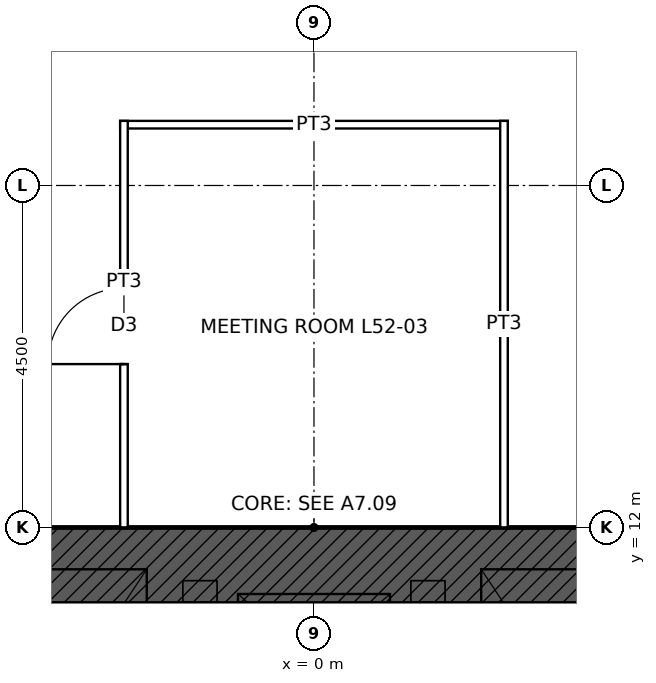
"""IFC4 building model, lengths in metres.
Left out: names, types, materials, properties, quantities, classifications, styles, units other than length and angle.
Written with IfcOpenShell. Run it as: python <this file> out.ifc"""

import sys

from ifc_helpers import new_model, si_unit, direction, frame, frame_2d, origin, place, context, subcontext, project, spatial, rectangle, extrude, element, fill, save


model = new_model("IFC4")
c1 = context("Model", 3, precision=1e-05, world=origin(), true_north=direction((0.0, 1.0)))
c2 = subcontext(c1, "Body", "Model", "MODEL_VIEW")
j1 = project(units=[si_unit("LENGTHUNIT", "METRE"), si_unit("PLANEANGLEUNIT", "RADIAN")], contexts=[c1])
p1 = place(None, origin())
s1 = spatial("IfcSite", under=j1, at=p1, CompositionType="ELEMENT")
p2 = place(p1, origin())
s2 = spatial("IfcBuilding", under=s1, at=p2, CompositionType="ELEMENT")
p3 = place(p2, frame((0.0, 0.0, 241.9)))
s3 = spatial("IfcBuildingStorey", under=s2, at=p3, CompositionType="ELEMENT", Elevation=241.9)
p4 = place(p3, frame((-12.0, 11.5, 0.0), z_axis=(0.0, 0.0, 1.0), x_axis=(1.0, 0.0, 0.0)))
e1 = element("IfcWall", 1, at=p4, inside=s3, PredefinedType="SHEAR", context=c2, shape_type="SweptSolid", body=[
    extrude(rectangle(XDim=24.0, YDim=1.0, at=frame_2d((12.0, 0.0))), origin(), (0.0, 0.0, 1.0), 4.0),
])
p5 = place(p4, frame((6.25, 0.0, 0.0)))
e2 = element("IfcOpeningElement", 2, at=p5, cuts=e1, PredefinedType="OPENING", context=c2, shape_type="SweptSolid", body=[
    extrude(rectangle(XDim=1.0, YDim=2.4, at=frame_2d((0.5, 1.2))), frame((0.0, 0.51, 0.0), z_axis=(0.0, -1.0, 0.0), x_axis=(1.0, 0.0, 0.0)), (0.0, 0.0, 1.0), 1.02),
])
p6 = place(p4, frame((16.75, 0.0, 0.0)))
e3 = element("IfcOpeningElement", 3, at=p6, cuts=e1, PredefinedType="OPENING", context=c2, shape_type="SweptSolid", body=[
    extrude(rectangle(XDim=1.0, YDim=2.4, at=frame_2d((0.5, 1.2))), frame((0.0, 0.51, 0.0), z_axis=(0.0, -1.0, 0.0), x_axis=(1.0, 0.0, 0.0)), (0.0, 0.0, 1.0), 1.02),
])
p7 = place(p3, frame((-2.55, 17.3, 0.0), z_axis=(0.0, 0.0, 1.0), x_axis=(1.0, 0.0, 0.0)))
e4 = element("IfcWall", 4, at=p7, inside=s3, PredefinedType="PARTITIONING", context=c2, shape_type="SweptSolid", body=[
    extrude(rectangle(XDim=5.1, YDim=0.1, at=frame_2d((2.55, 0.0))), origin(), (0.0, 0.0, 1.0), 3.85),
])
p8 = place(p3, frame((-2.5, 12.0, 0.0), z_axis=(0.0, 0.0, 1.0), x_axis=(0.0, 1.0, 0.0)))
e5 = element("IfcWall", 5, at=p8, inside=s3, PredefinedType="PARTITIONING", context=c2, shape_type="SweptSolid", body=[
    extrude(rectangle(XDim=5.35, YDim=0.1, at=frame_2d((2.675, 0.0))), origin(), (0.0, 0.0, 1.0), 3.85),
])
p9 = place(p8, frame((2.15, 0.0, 0.0)))
e6 = element("IfcOpeningElement", 6, at=p9, cuts=e5, PredefinedType="OPENING", context=c2, shape_type="SweptSolid", body=[
    extrude(rectangle(XDim=1.0, YDim=2.1, at=frame_2d((0.5, 1.05))), frame((0.0, 0.06, 0.0), z_axis=(0.0, -1.0, 0.0), x_axis=(1.0, 0.0, 0.0)), (0.0, 0.0, 1.0), 0.12),
])
p10 = place(p3, frame((2.5, 12.0, 0.0), z_axis=(0.0, 0.0, 1.0), x_axis=(0.0, 1.0, 0.0)))
e7 = element("IfcWall", 7, at=p10, inside=s3, PredefinedType="PARTITIONING", context=c2, shape_type="SweptSolid", body=[
    extrude(rectangle(XDim=5.35, YDim=0.1, at=frame_2d((2.675, 0.0))), origin(), (0.0, 0.0, 1.0), 3.85),
])
p11 = place(p9, origin())
e8 = element("IfcDoor", 8, at=p11, inside=s3, OperationType="SINGLE_SWING_LEFT", PredefinedType="DOOR", context=c2, shape_type="SweptSolid", body=[
    extrude(rectangle(XDim=1.0, YDim=2.1, at=frame_2d((0.5, 1.05))), frame((0.0, 0.025, 0.0), z_axis=(0.0, -1.0, 0.0), x_axis=(1.0, 0.0, 0.0)), (0.0, 0.0, 1.0), 0.05),
])
fill(e6, e8)
save(model, sys.argv[1])
